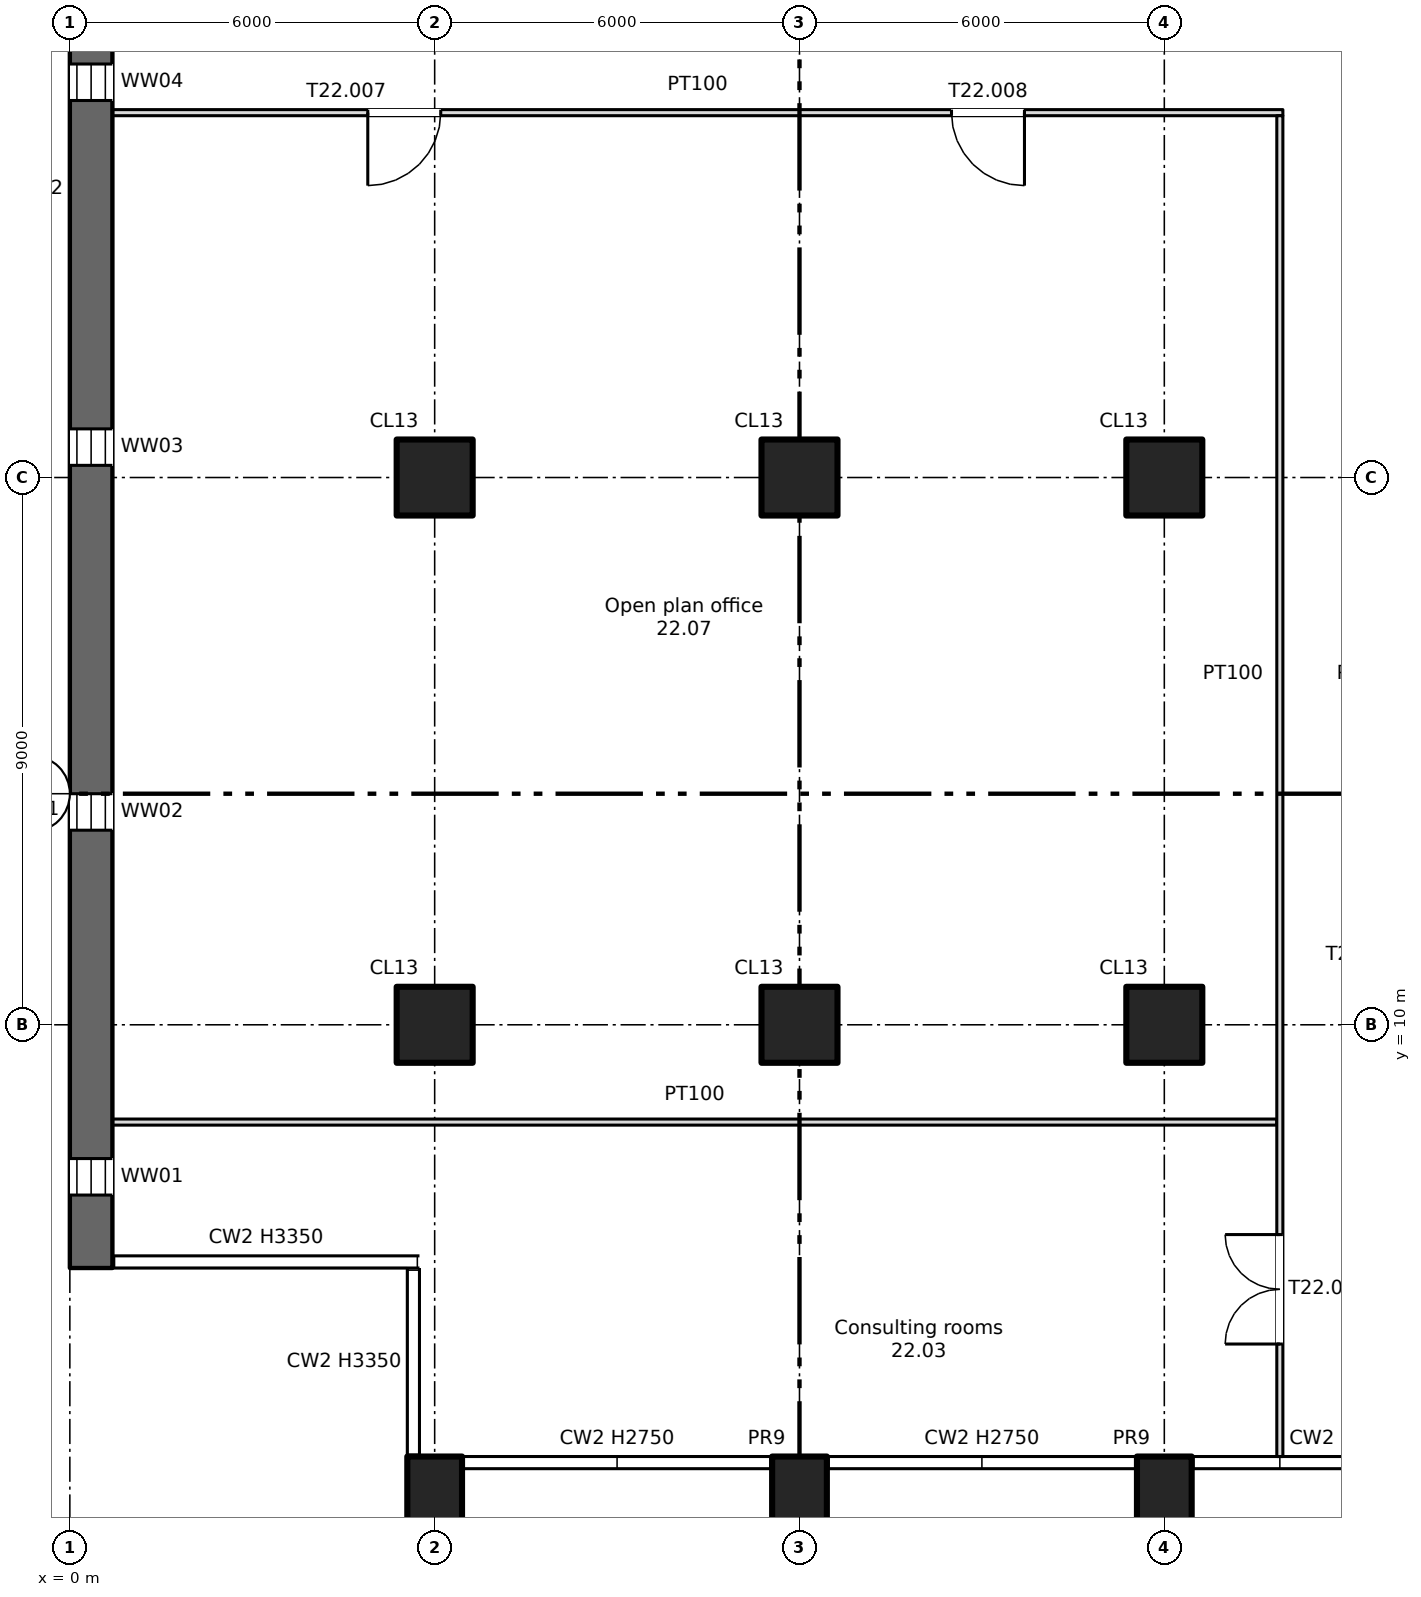
"""IFC4 building model, lengths in metres.
Left out: names, types, materials, properties, quantities, classifications, styles, units other than length and angle.
Written with IfcOpenShell. Run it as: python <this file> out.ifc"""

import sys

from ifc_helpers import new_model, si_unit, direction, frame, frame_2d, origin, origin_2d, place, context, subcontext, project, spatial, rectangle, extrude, element, fill, save


model = new_model("IFC4")
c1 = context("Model", 3, precision=1e-05, world=origin(), true_north=direction((0.0, 1.0)))
c2 = subcontext(c1, "Body", "Model", "MODEL_VIEW")
j1 = project(units=[si_unit("LENGTHUNIT", "METRE"), si_unit("PLANEANGLEUNIT", "RADIAN")], contexts=[c1])
p1 = place(None, origin())
s1 = spatial("IfcSite", under=j1, at=p1, CompositionType="ELEMENT")
p2 = place(p1, origin())
s2 = spatial("IfcBuilding", under=s1, at=p2, CompositionType="ELEMENT")
p3 = place(p2, frame((0.0, 0.0, 143.75)))
s3 = spatial("IfcBuildingStorey", under=s2, at=p3, CompositionType="ELEMENT", Elevation=143.75)
for number, where, z_axis, x_axis in (
    (1, (6.0, 2.2, -0.4), (0.0, 0.0, 1.0), (1.0, 0.0, 0.0)),
    (2, (12.0, 2.2, -0.4), (0.0, 0.0, 1.0), (1.0, 0.0, 0.0)),
    (3, (18.0, 2.2, -0.4), (0.0, 0.0, 1.0), (1.0, 0.0, 0.0)),
):
    element("IfcColumn", number, at=place(p3, frame(where, z_axis=z_axis, x_axis=x_axis)), inside=s3, PredefinedType="COLUMN", context=c2, shape_type="SweptSolid", body=[
        extrude(rectangle(XDim=0.9, YDim=1.4, at=origin_2d()), origin(), (0.0, 0.0, 1.0), 3.75),
    ])
for number, where, z_axis, x_axis in (
    (4, (6.0, 10.0, 0.0), (0.0, 0.0, 1.0), (1.0, 0.0, 0.0)),
    (5, (6.0, 19.0, 0.0), (0.0, 0.0, 1.0), (1.0, 0.0, 0.0)),
    (6, (12.0, 10.0, 0.0), (0.0, 0.0, 1.0), (1.0, 0.0, 0.0)),
    (7, (12.0, 19.0, 0.0), (0.0, 0.0, 1.0), (1.0, 0.0, 0.0)),
    (8, (18.0, 10.0, 0.0), (0.0, 0.0, 1.0), (1.0, 0.0, 0.0)),
    (9, (18.0, 19.0, 0.0), (0.0, 0.0, 1.0), (1.0, 0.0, 0.0)),
):
    element("IfcColumn", number, at=place(p3, frame(where, z_axis=z_axis, x_axis=x_axis)), inside=s3, PredefinedType="COLUMN", context=c2, shape_type="SweptSolid", body=[
        extrude(rectangle(XDim=1.25, YDim=1.25, at=origin_2d()), origin(), (0.0, 0.0, 1.0), 3.35),
    ])
p4 = place(p3, frame((0.35, 6.0, 0.0), z_axis=(0.0, 0.0, 1.0), x_axis=(0.0, 1.0, 0.0)))
e10 = element("IfcWall", 10, at=p4, inside=s3, PredefinedType="SHEAR", context=c2, shape_type="SweptSolid", body=[
    extrude(rectangle(XDim=35.5, YDim=0.7, at=frame_2d((17.75, 0.0))), origin(), (0.0, 0.0, 1.0), 3.35),
])
p5 = place(p4, frame((1.2, 0.0, 0.6)))
e11 = element("IfcOpeningElement", 11, at=p5, cuts=e10, PredefinedType="OPENING", context=c2, shape_type="SweptSolid", body=[
    extrude(rectangle(XDim=0.6, YDim=2.4, at=frame_2d((0.3, 1.2))), frame((0.0, 0.36, 0.0), z_axis=(0.0, -1.0, 0.0), x_axis=(1.0, 0.0, 0.0)), (0.0, 0.0, 1.0), 0.72),
])
p6 = place(p4, frame((7.2, 0.0, 0.6)))
e12 = element("IfcOpeningElement", 12, at=p6, cuts=e10, PredefinedType="OPENING", context=c2, shape_type="SweptSolid", body=[
    extrude(rectangle(XDim=0.6, YDim=2.4, at=frame_2d((0.3, 1.2))), frame((0.0, 0.36, 0.0), z_axis=(0.0, -1.0, 0.0), x_axis=(1.0, 0.0, 0.0)), (0.0, 0.0, 1.0), 0.72),
])
p7 = place(p4, frame((13.2, 0.0, 0.6)))
e13 = element("IfcOpeningElement", 13, at=p7, cuts=e10, PredefinedType="OPENING", context=c2, shape_type="SweptSolid", body=[
    extrude(rectangle(XDim=0.6, YDim=2.4, at=frame_2d((0.3, 1.2))), frame((0.0, 0.36, 0.0), z_axis=(0.0, -1.0, 0.0), x_axis=(1.0, 0.0, 0.0)), (0.0, 0.0, 1.0), 0.72),
])
p8 = place(p4, frame((19.2, 0.0, 0.6)))
e14 = element("IfcOpeningElement", 14, at=p8, cuts=e10, PredefinedType="OPENING", context=c2, shape_type="SweptSolid", body=[
    extrude(rectangle(XDim=0.6, YDim=2.4, at=frame_2d((0.3, 1.2))), frame((0.0, 0.36, 0.0), z_axis=(0.0, -1.0, 0.0), x_axis=(1.0, 0.0, 0.0)), (0.0, 0.0, 1.0), 0.72),
])
p9 = place(p4, frame((25.2, 0.0, 0.6)))
e15 = element("IfcOpeningElement", 15, at=p9, cuts=e10, PredefinedType="OPENING", context=c2, shape_type="SweptSolid", body=[
    extrude(rectangle(XDim=0.6, YDim=2.4, at=frame_2d((0.3, 1.2))), frame((0.0, 0.36, 0.0), z_axis=(0.0, -1.0, 0.0), x_axis=(1.0, 0.0, 0.0)), (0.0, 0.0, 1.0), 0.72),
])
p10 = place(p4, frame((31.2, 0.0, 0.6)))
e16 = element("IfcOpeningElement", 16, at=p10, cuts=e10, PredefinedType="OPENING", context=c2, shape_type="SweptSolid", body=[
    extrude(rectangle(XDim=0.6, YDim=2.4, at=frame_2d((0.3, 1.2))), frame((0.0, 0.36, 0.0), z_axis=(0.0, -1.0, 0.0), x_axis=(1.0, 0.0, 0.0)), (0.0, 0.0, 1.0), 0.72),
])
p11 = place(p3, frame((0.7, 8.4, 0.0), z_axis=(0.0, 0.0, 1.0), x_axis=(1.0, 0.0, 0.0)))
e17 = element("IfcWall", 17, at=p11, inside=s3, PredefinedType="PARTITIONING", context=c2, shape_type="SweptSolid", body=[
    extrude(rectangle(XDim=19.15, YDim=0.1, at=frame_2d((9.575, 0.0))), origin(), (0.0, 0.0, 1.0), 3.35),
])
p12 = place(p3, frame((0.7, 25.0, 0.0), z_axis=(0.0, 0.0, 1.0), x_axis=(1.0, 0.0, 0.0)))
e18 = element("IfcWall", 18, at=p12, inside=s3, PredefinedType="PARTITIONING", context=c2, shape_type="SweptSolid", body=[
    extrude(rectangle(XDim=19.25, YDim=0.1, at=frame_2d((9.625, 0.0))), origin(), (0.0, 0.0, 1.0), 3.35),
])
p13 = place(p12, frame((4.2, 0.0, 0.0)))
e19 = element("IfcOpeningElement", 19, at=p13, cuts=e18, PredefinedType="OPENING", context=c2, shape_type="SweptSolid", body=[
    extrude(rectangle(XDim=1.2, YDim=2.1, at=frame_2d((0.6, 1.05))), frame((0.0, 0.06, 0.0), z_axis=(0.0, -1.0, 0.0), x_axis=(1.0, 0.0, 0.0)), (0.0, 0.0, 1.0), 0.12),
])
p14 = place(p12, frame((13.8, 0.0, 0.0)))
e20 = element("IfcOpeningElement", 20, at=p14, cuts=e18, PredefinedType="OPENING", context=c2, shape_type="SweptSolid", body=[
    extrude(rectangle(XDim=1.2, YDim=2.1, at=frame_2d((0.6, 1.05))), frame((0.0, 0.06, 0.0), z_axis=(0.0, -1.0, 0.0), x_axis=(1.0, 0.0, 0.0)), (0.0, 0.0, 1.0), 0.12),
])
p15 = place(p3, frame((19.9, 2.9, 0.0), z_axis=(0.0, 0.0, 1.0), x_axis=(0.0, 1.0, 0.0)))
e21 = element("IfcWall", 21, at=p15, inside=s3, PredefinedType="PARTITIONING", context=c2, shape_type="SweptSolid", body=[
    extrude(rectangle(XDim=22.05, YDim=0.1, at=frame_2d((11.025, 0.0))), origin(), (0.0, 0.0, 1.0), 3.35),
])
p16 = place(p15, frame((1.85, 0.0, 0.0)))
e22 = element("IfcOpeningElement", 22, at=p16, cuts=e21, PredefinedType="OPENING", context=c2, shape_type="SweptSolid", body=[
    extrude(rectangle(XDim=1.8, YDim=2.1, at=frame_2d((0.9, 1.05))), frame((0.0, 0.06, 0.0), z_axis=(0.0, -1.0, 0.0), x_axis=(1.0, 0.0, 0.0)), (0.0, 0.0, 1.0), 0.12),
])
p17 = place(p5, origin())
e23 = element("IfcWindow", 23, at=p17, inside=s3, PartitioningType="SINGLE_PANEL", PredefinedType="WINDOW", context=c2, shape_type="SweptSolid", body=[
    extrude(rectangle(XDim=0.6, YDim=2.4, at=frame_2d((0.3, 1.2))), frame((0.0, 0.03, 0.0), z_axis=(0.0, -1.0, 0.0), x_axis=(1.0, 0.0, 0.0)), (0.0, 0.0, 1.0), 0.06),
])
fill(e11, e23)
p18 = place(p6, origin())
e24 = element("IfcWindow", 24, at=p18, inside=s3, PartitioningType="SINGLE_PANEL", PredefinedType="WINDOW", context=c2, shape_type="SweptSolid", body=[
    extrude(rectangle(XDim=0.6, YDim=2.4, at=frame_2d((0.3, 1.2))), frame((0.0, 0.03, 0.0), z_axis=(0.0, -1.0, 0.0), x_axis=(1.0, 0.0, 0.0)), (0.0, 0.0, 1.0), 0.06),
])
fill(e12, e24)
p19 = place(p7, origin())
e25 = element("IfcWindow", 25, at=p19, inside=s3, PartitioningType="SINGLE_PANEL", PredefinedType="WINDOW", context=c2, shape_type="SweptSolid", body=[
    extrude(rectangle(XDim=0.6, YDim=2.4, at=frame_2d((0.3, 1.2))), frame((0.0, 0.03, 0.0), z_axis=(0.0, -1.0, 0.0), x_axis=(1.0, 0.0, 0.0)), (0.0, 0.0, 1.0), 0.06),
])
fill(e13, e25)
p20 = place(p8, origin())
e26 = element("IfcWindow", 26, at=p20, inside=s3, PartitioningType="SINGLE_PANEL", PredefinedType="WINDOW", context=c2, shape_type="SweptSolid", body=[
    extrude(rectangle(XDim=0.6, YDim=2.4, at=frame_2d((0.3, 1.2))), frame((0.0, 0.03, 0.0), z_axis=(0.0, -1.0, 0.0), x_axis=(1.0, 0.0, 0.0)), (0.0, 0.0, 1.0), 0.06),
])
fill(e14, e26)
p21 = place(p16, origin())
e27 = element("IfcDoor", 27, at=p21, inside=s3, OperationType="DOUBLE_DOOR_SINGLE_SWING", PredefinedType="DOOR", context=c2, shape_type="SweptSolid", body=[
    extrude(rectangle(XDim=1.8, YDim=2.1, at=frame_2d((0.9, 1.05))), frame((0.0, 0.025, 0.0), z_axis=(0.0, -1.0, 0.0), x_axis=(1.0, 0.0, 0.0)), (0.0, 0.0, 1.0), 0.05),
])
fill(e22, e27)
p22 = place(p13, origin())
e28 = element("IfcDoor", 28, at=p22, inside=s3, OperationType="SINGLE_SWING_LEFT", PredefinedType="DOOR", context=c2, shape_type="SweptSolid", body=[
    extrude(rectangle(XDim=1.2, YDim=2.1, at=frame_2d((0.6, 1.05))), frame((0.0, 0.025, 0.0), z_axis=(0.0, -1.0, 0.0), x_axis=(1.0, 0.0, 0.0)), (0.0, 0.0, 1.0), 0.05),
])
fill(e19, e28)
p23 = place(p14, origin())
e29 = element("IfcDoor", 29, at=p23, inside=s3, OperationType="SINGLE_SWING_RIGHT", PredefinedType="DOOR", context=c2, shape_type="SweptSolid", body=[
    extrude(rectangle(XDim=1.2, YDim=2.1, at=frame_2d((0.6, 1.05))), frame((0.0, 0.025, 0.0), z_axis=(0.0, -1.0, 0.0), x_axis=(1.0, 0.0, 0.0)), (0.0, 0.0, 1.0), 0.05),
])
fill(e20, e29)
save(model, sys.argv[1])
